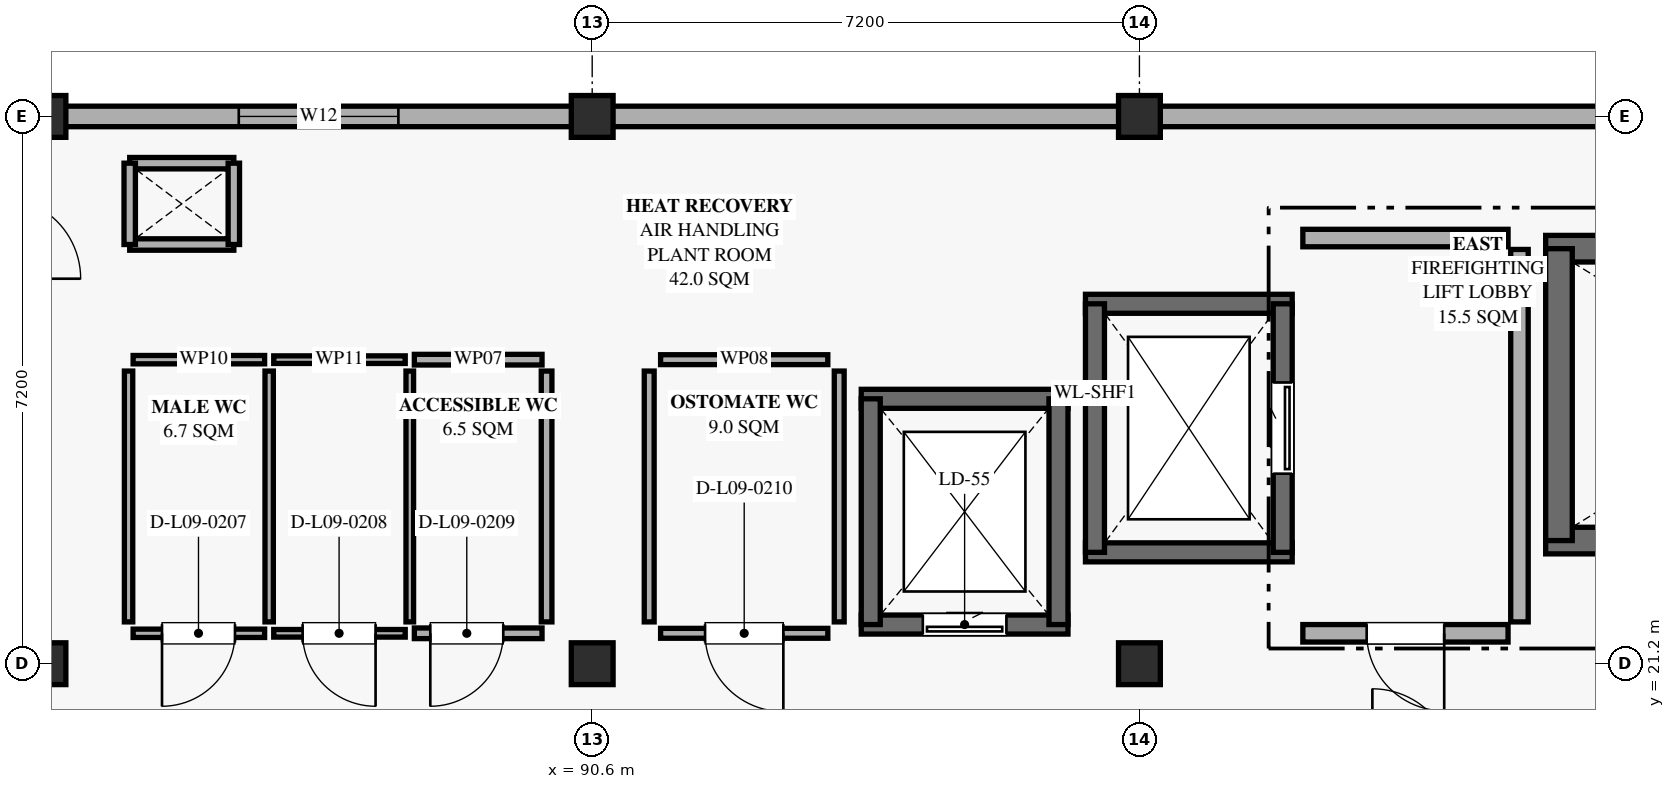
"""IFC4 building model, lengths in metres.
Left out: names, types, materials, properties, quantities, classifications, styles, units other than length and angle.
Written with IfcOpenShell. Run it as: python <this file> out.ifc"""

import sys

from ifc_helpers import new_model, si_unit, direction, frame, frame_2d, origin, origin_2d, place, context, subcontext, project, spatial, rectangle, extrude, element, fill, save


model = new_model("IFC4")
c1 = context("Model", 3, precision=1e-05, world=origin(), true_north=direction((0.0, 1.0)))
c2 = subcontext(c1, "Body", "Model", "MODEL_VIEW")
j1 = project(units=[si_unit("LENGTHUNIT", "METRE"), si_unit("PLANEANGLEUNIT", "RADIAN")], contexts=[c1])
p1 = place(None, origin())
s1 = spatial("IfcSite", under=j1, at=p1, CompositionType="ELEMENT")
p2 = place(p1, origin())
s2 = spatial("IfcBuilding", under=s1, at=p2, CompositionType="ELEMENT")
p3 = place(p2, frame((0.0, 0.0, 41.94)))
s3 = spatial("IfcBuildingStorey", under=s2, at=p3, CompositionType="ELEMENT", Elevation=41.94)
for number, where, z_axis, x_axis in (
    (1, (83.4, 21.2, 0.0), (0.0, 0.0, 1.0), (1.0, 0.0, 0.0)),
    (2, (90.6, 21.2, 0.0), (0.0, 0.0, 1.0), (1.0, 0.0, 0.0)),
    (3, (97.8, 21.2, 0.0), (0.0, 0.0, 1.0), (1.0, 0.0, 0.0)),
    (4, (83.4, 28.4, 0.0), (0.0, 0.0, 1.0), (1.0, 0.0, 0.0)),
    (5, (90.6, 28.4, 0.0), (0.0, 0.0, 1.0), (1.0, 0.0, 0.0)),
    (6, (97.8, 28.4, 0.0), (0.0, 0.0, 1.0), (1.0, 0.0, 0.0)),
):
    element("IfcColumn", number, at=place(p3, frame(where, z_axis=z_axis, x_axis=x_axis)), inside=s3, PredefinedType="COLUMN", context=c2, shape_type="SweptSolid", body=[
        extrude(rectangle(XDim=0.55, YDim=0.55, at=origin_2d()), origin(), (0.0, 0.0, 1.0), 4.32),
    ])
p4 = place(p3, frame((83.66, 28.4, 0.0), z_axis=(0.0, 0.0, 1.0), x_axis=(1.0, 0.0, 0.0)))
e7 = element("IfcWall", 7, at=p4, inside=s3, PredefinedType="SOLIDWALL", context=c2, shape_type="SweptSolid", body=[
    extrude(rectangle(XDim=6.68, YDim=0.27, at=frame_2d((3.34, 0.0))), origin(), (0.0, 0.0, 1.0), 2.82),
])
p5 = place(p4, frame((2.29, 0.0, 0.85)))
e8 = element("IfcOpeningElement", 8, at=p5, cuts=e7, PredefinedType="OPENING", context=c2, shape_type="SweptSolid", body=[
    extrude(rectangle(XDim=2.1, YDim=1.8, at=frame_2d((1.05, 0.9))), frame((0.0, 0.145, 0.0), z_axis=(0.0, -1.0, 0.0), x_axis=(1.0, 0.0, 0.0)), (0.0, 0.0, 1.0), 0.29),
])
for number, where, z_axis, x_axis in (
    (9, (90.86, 28.4, 0.0), (0.0, 0.0, 1.0), (1.0, 0.0, 0.0)),
    (10, (98.06, 28.4, 0.0), (0.0, 0.0, 1.0), (1.0, 0.0, 0.0)),
):
    element("IfcWall", number, at=place(p3, frame(where, z_axis=z_axis, x_axis=x_axis)), inside=s3, PredefinedType="SOLIDWALL", context=c2, shape_type="SweptSolid", body=[
        extrude(rectangle(XDim=6.68, YDim=0.27, at=frame_2d((3.34, 0.0))), origin(), (0.0, 0.0, 1.0), 2.82),
    ])
p6 = place(p3, frame((111.155, 22.82, 0.0), z_axis=(0.0, 0.0, 1.0), x_axis=(-1.0, 0.0, 0.0)))
e11 = element("IfcWall", 11, at=p6, inside=s3, PredefinedType="SHEAR", context=c2, shape_type="SweptSolid", body=[
    extrude(rectangle(XDim=8.01, YDim=0.35, at=frame_2d((4.005, 0.0))), origin(), (0.0, 0.0, 1.0), 4.07),
])
p7 = place(p6, frame((0.85, 0.0, 0.0)))
e12 = element("IfcOpeningElement", 12, at=p7, cuts=e11, PredefinedType="OPENING", context=c2, shape_type="SweptSolid", body=[
    extrude(rectangle(XDim=1.18, YDim=2.12, at=frame_2d((0.59, 1.06))), frame((0.0, 0.185, 0.0), z_axis=(0.0, -1.0, 0.0), x_axis=(1.0, 0.0, 0.0)), (0.0, 0.0, 1.0), 0.37),
])
p8 = place(p3, frame((103.145, 26.66, 0.0), z_axis=(0.0, 0.0, 1.0), x_axis=(1.0, 0.0, 0.0)))
e13 = element("IfcWall", 13, at=p8, inside=s3, PredefinedType="SHEAR", context=c2, shape_type="SweptSolid", body=[
    extrude(rectangle(XDim=8.01, YDim=0.35, at=frame_2d((4.005, 0.0))), origin(), (0.0, 0.0, 1.0), 4.07),
])
p9 = place(p3, frame((103.32, 22.82, 0.0), z_axis=(0.0, 0.0, 1.0), x_axis=(0.0, 1.0, 0.0)))
e14 = element("IfcWall", 14, at=p9, inside=s3, PredefinedType="SHEAR", context=c2, shape_type="SweptSolid", body=[
    extrude(rectangle(XDim=3.84, YDim=0.35, at=frame_2d((1.92, 0.0))), origin(), (0.0, 0.0, 1.0), 4.07),
])
for number, where, z_axis, x_axis in (
    (15, (85.885, 26.715, 0.0), (0.0, 0.0, 1.0), (-1.0, 0.0, 0.0)),
    (16, (84.515, 27.785, 0.0), (0.0, 0.0, 1.0), (1.0, 0.0, 0.0)),
):
    element("IfcWall", number, at=place(p3, frame(where, z_axis=z_axis, x_axis=x_axis)), inside=s3, PredefinedType="PARTITIONING", context=c2, shape_type="SweptSolid", body=[
        extrude(rectangle(XDim=1.37, YDim=0.15, at=frame_2d((0.685, 0.0))), origin(), (0.0, 0.0, 1.0), 2.8),
    ])
for number, where, z_axis, x_axis in (
    (17, (84.515, 26.715, 0.0), (0.0, 0.0, 1.0), (0.0, 1.0, 0.0)),
    (18, (85.885, 27.785, 0.0), (0.0, 0.0, 1.0), (0.0, -1.0, 0.0)),
):
    element("IfcWall", number, at=place(p3, frame(where, z_axis=z_axis, x_axis=x_axis)), inside=s3, PredefinedType="PARTITIONING", context=c2, shape_type="SweptSolid", body=[
        extrude(rectangle(XDim=1.07, YDim=0.15, at=frame_2d((0.535, 0.0))), origin(), (0.0, 0.0, 1.0), 2.8),
    ])
for number, where, z_axis, x_axis in (
    (19, (99.81, 22.665, 0.0), (0.0, 0.0, 1.0), (-1.0, 0.0, 0.0)),
    (20, (97.09, 25.935, 0.0), (0.0, 0.0, 1.0), (1.0, 0.0, 0.0)),
):
    element("IfcWall", number, at=place(p3, frame(where, z_axis=z_axis, x_axis=x_axis)), inside=s3, PredefinedType="SHEAR", context=c2, shape_type="SweptSolid", body=[
        extrude(rectangle(XDim=2.72, YDim=0.25, at=frame_2d((1.36, 0.0))), origin(), (0.0, 0.0, 1.0), 4.07),
    ])
p10 = place(p3, frame((97.215, 22.665, 0.0), z_axis=(0.0, 0.0, 1.0), x_axis=(0.0, 1.0, 0.0)))
e21 = element("IfcWall", 21, at=p10, inside=s3, PredefinedType="SHEAR", context=c2, shape_type="SweptSolid", body=[
    extrude(rectangle(XDim=3.27, YDim=0.25, at=frame_2d((1.635, 0.0))), origin(), (0.0, 0.0, 1.0), 4.07),
])
p11 = place(p3, frame((99.685, 25.935, 0.0), z_axis=(0.0, 0.0, 1.0), x_axis=(0.0, -1.0, 0.0)))
e22 = element("IfcWall", 22, at=p11, inside=s3, PredefinedType="SHEAR", context=c2, shape_type="SweptSolid", body=[
    extrude(rectangle(XDim=3.27, YDim=0.25, at=frame_2d((1.635, 0.0))), origin(), (0.0, 0.0, 1.0), 4.07),
])
p12 = place(p11, frame((1.035, 0.0, 0.0)))
e23 = element("IfcOpeningElement", 23, at=p12, cuts=e22, PredefinedType="OPENING", context=c2, shape_type="SweptSolid", body=[
    extrude(rectangle(XDim=1.2, YDim=2.25, at=frame_2d((0.6, 1.125))), frame((0.0, 0.135, 0.0), z_axis=(0.0, -1.0, 0.0), x_axis=(1.0, 0.0, 0.0)), (0.0, 0.0, 1.0), 0.27),
])
p13 = place(p3, frame((96.86, 21.715, 0.0), z_axis=(0.0, 0.0, 1.0), x_axis=(-1.0, 0.0, 0.0)))
e24 = element("IfcWall", 24, at=p13, inside=s3, PredefinedType="SHEAR", context=c2, shape_type="SweptSolid", body=[
    extrude(rectangle(XDim=2.72, YDim=0.25, at=frame_2d((1.36, 0.0))), origin(), (0.0, 0.0, 1.0), 4.07),
])
p14 = place(p13, frame((0.81, 0.0, 0.0)))
e25 = element("IfcOpeningElement", 25, at=p14, cuts=e24, PredefinedType="OPENING", context=c2, shape_type="SweptSolid", body=[
    extrude(rectangle(XDim=1.1, YDim=2.2, at=frame_2d((0.55, 1.1))), frame((0.0, 0.135, 0.0), z_axis=(0.0, -1.0, 0.0), x_axis=(1.0, 0.0, 0.0)), (0.0, 0.0, 1.0), 0.27),
])
p15 = place(p3, frame((94.14, 24.685, 0.0), z_axis=(0.0, 0.0, 1.0), x_axis=(1.0, 0.0, 0.0)))
e26 = element("IfcWall", 26, at=p15, inside=s3, PredefinedType="SHEAR", context=c2, shape_type="SweptSolid", body=[
    extrude(rectangle(XDim=2.72, YDim=0.25, at=frame_2d((1.36, 0.0))), origin(), (0.0, 0.0, 1.0), 4.07),
])
for number, where, z_axis, x_axis in (
    (27, (94.265, 21.715, 0.0), (0.0, 0.0, 1.0), (0.0, 1.0, 0.0)),
    (28, (96.735, 24.685, 0.0), (0.0, 0.0, 1.0), (0.0, -1.0, 0.0)),
):
    element("IfcWall", number, at=place(p3, frame(where, z_axis=z_axis, x_axis=x_axis)), inside=s3, PredefinedType="SHEAR", context=c2, shape_type="SweptSolid", body=[
        extrude(rectangle(XDim=2.97, YDim=0.25, at=frame_2d((1.485, 0.0))), origin(), (0.0, 0.0, 1.0), 4.07),
    ])
p16 = place(p3, frame((102.65, 21.6, 0.0), z_axis=(0.0, 0.0, 1.0), x_axis=(-1.0, 0.0, 0.0)))
e29 = element("IfcWall", 29, at=p16, inside=s3, PredefinedType="PARTITIONING", context=c2, shape_type="SweptSolid", body=[
    extrude(rectangle(XDim=2.7, YDim=0.23, at=frame_2d((1.35, 0.0))), origin(), (0.0, 0.0, 1.0), 2.8),
])
p17 = place(p16, frame((0.84, 0.0, 0.0)))
e30 = element("IfcOpeningElement", 30, at=p17, cuts=e29, PredefinedType="OPENING", context=c2, shape_type="SweptSolid", body=[
    extrude(rectangle(XDim=1.02, YDim=2.12, at=frame_2d((0.51, 1.06))), frame((0.0, 0.125, 0.0), z_axis=(0.0, -1.0, 0.0), x_axis=(1.0, 0.0, 0.0)), (0.0, 0.0, 1.0), 0.25),
])
p18 = place(p3, frame((99.95, 26.8, 0.0), z_axis=(0.0, 0.0, 1.0), x_axis=(1.0, 0.0, 0.0)))
e31 = element("IfcWall", 31, at=p18, inside=s3, PredefinedType="PARTITIONING", context=c2, shape_type="SweptSolid", body=[
    extrude(rectangle(XDim=2.7, YDim=0.23, at=frame_2d((1.35, 0.0))), origin(), (0.0, 0.0, 1.0), 2.8),
])
p19 = place(p3, frame((102.8, 26.65, 0.0), z_axis=(0.0, 0.0, 1.0), x_axis=(0.0, -1.0, 0.0)))
e32 = element("IfcWall", 32, at=p19, inside=s3, PredefinedType="PARTITIONING", context=c2, shape_type="SweptSolid", body=[
    extrude(rectangle(XDim=4.9, YDim=0.23, at=frame_2d((2.45, 0.0))), origin(), (0.0, 0.0, 1.0), 2.8),
])
p20 = place(p3, frame((86.29, 21.6, 0.0), z_axis=(0.0, 0.0, 1.0), x_axis=(-1.0, 0.0, 0.0)))
e33 = element("IfcWall", 33, at=p20, inside=s3, PredefinedType="PARTITIONING", context=c2, shape_type="SweptSolid", body=[
    extrude(rectangle(XDim=1.73, YDim=0.11, at=frame_2d((0.865, 0.0))), origin(), (0.0, 0.0, 1.0), 2.8),
])
p21 = place(p20, frame((0.39, 0.0, 0.0)))
e34 = element("IfcOpeningElement", 34, at=p21, cuts=e33, PredefinedType="OPENING", context=c2, shape_type="SweptSolid", body=[
    extrude(rectangle(XDim=0.96, YDim=2.05, at=frame_2d((0.48, 1.025))), frame((0.0, 0.065, 0.0), z_axis=(0.0, -1.0, 0.0), x_axis=(1.0, 0.0, 0.0)), (0.0, 0.0, 1.0), 0.13),
])
p22 = place(p3, frame((84.56, 25.2, 0.0), z_axis=(0.0, 0.0, 1.0), x_axis=(1.0, 0.0, 0.0)))
e35 = element("IfcWall", 35, at=p22, inside=s3, PredefinedType="PARTITIONING", context=c2, shape_type="SweptSolid", body=[
    extrude(rectangle(XDim=1.73, YDim=0.11, at=frame_2d((0.865, 0.0))), origin(), (0.0, 0.0, 1.0), 2.8),
])
for number, where, z_axis, x_axis in (
    (36, (84.5, 21.75, 0.0), (0.0, 0.0, 1.0), (0.0, 1.0, 0.0)),
    (37, (86.35, 25.05, 0.0), (0.0, 0.0, 1.0), (0.0, -1.0, 0.0)),
):
    element("IfcWall", number, at=place(p3, frame(where, z_axis=z_axis, x_axis=x_axis)), inside=s3, PredefinedType="PARTITIONING", context=c2, shape_type="SweptSolid", body=[
        extrude(rectangle(XDim=3.3, YDim=0.11, at=frame_2d((1.65, 0.0))), origin(), (0.0, 0.0, 1.0), 2.8),
    ])
p23 = place(p3, frame((88.14, 21.6, 0.0), z_axis=(0.0, 0.0, 1.0), x_axis=(-1.0, 0.0, 0.0)))
e38 = element("IfcWall", 38, at=p23, inside=s3, PredefinedType="PARTITIONING", context=c2, shape_type="SweptSolid", body=[
    extrude(rectangle(XDim=1.73, YDim=0.1, at=frame_2d((0.865, 0.0))), origin(), (0.0, 0.0, 1.0), 2.8),
])
p24 = place(p23, frame((0.39, 0.0, 0.0)))
e39 = element("IfcOpeningElement", 39, at=p24, cuts=e38, PredefinedType="OPENING", context=c2, shape_type="SweptSolid", body=[
    extrude(rectangle(XDim=0.96, YDim=2.1, at=frame_2d((0.48, 1.05))), frame((0.0, 0.06, 0.0), z_axis=(0.0, -1.0, 0.0), x_axis=(1.0, 0.0, 0.0)), (0.0, 0.0, 1.0), 0.12),
])
p25 = place(p3, frame((86.41, 25.2, 0.0), z_axis=(0.0, 0.0, 1.0), x_axis=(1.0, 0.0, 0.0)))
e40 = element("IfcWall", 40, at=p25, inside=s3, PredefinedType="PARTITIONING", context=c2, shape_type="SweptSolid", body=[
    extrude(rectangle(XDim=1.73, YDim=0.1, at=frame_2d((0.865, 0.0))), origin(), (0.0, 0.0, 1.0), 2.8),
])
p26 = place(p3, frame((88.2, 25.05, 0.0), z_axis=(0.0, 0.0, 1.0), x_axis=(0.0, -1.0, 0.0)))
e41 = element("IfcWall", 41, at=p26, inside=s3, PredefinedType="PARTITIONING", context=c2, shape_type="SweptSolid", body=[
    extrude(rectangle(XDim=3.3, YDim=0.1, at=frame_2d((1.65, 0.0))), origin(), (0.0, 0.0, 1.0), 2.8),
])
p27 = place(p3, frame((89.94, 21.6, 0.0), z_axis=(0.0, 0.0, 1.0), x_axis=(-1.0, 0.0, 0.0)))
e42 = element("IfcWall", 42, at=p27, inside=s3, PredefinedType="PARTITIONING", context=c2, shape_type="SweptSolid", body=[
    extrude(rectangle(XDim=1.68, YDim=0.14, at=frame_2d((0.84, 0.0))), origin(), (0.0, 0.0, 1.0), 2.8),
])
p28 = place(p27, frame((0.51, 0.0, 0.0)))
e43 = element("IfcOpeningElement", 43, at=p28, cuts=e42, PredefinedType="OPENING", context=c2, shape_type="SweptSolid", body=[
    extrude(rectangle(XDim=0.96, YDim=2.16, at=frame_2d((0.48, 1.08))), frame((0.0, 0.08, 0.0), z_axis=(0.0, -1.0, 0.0), x_axis=(1.0, 0.0, 0.0)), (0.0, 0.0, 1.0), 0.16),
])
p29 = place(p3, frame((88.26, 25.2, 0.0), z_axis=(0.0, 0.0, 1.0), x_axis=(1.0, 0.0, 0.0)))
e44 = element("IfcWall", 44, at=p29, inside=s3, PredefinedType="PARTITIONING", context=c2, shape_type="SweptSolid", body=[
    extrude(rectangle(XDim=1.68, YDim=0.14, at=frame_2d((0.84, 0.0))), origin(), (0.0, 0.0, 1.0), 2.8),
])
p30 = place(p3, frame((90.0, 25.05, 0.0), z_axis=(0.0, 0.0, 1.0), x_axis=(0.0, -1.0, 0.0)))
e45 = element("IfcWall", 45, at=p30, inside=s3, PredefinedType="PARTITIONING", context=c2, shape_type="SweptSolid", body=[
    extrude(rectangle(XDim=3.3, YDim=0.14, at=frame_2d((1.65, 0.0))), origin(), (0.0, 0.0, 1.0), 2.8),
])
p31 = place(p3, frame((93.7, 21.6, 0.0), z_axis=(0.0, 0.0, 1.0), x_axis=(-1.0, 0.0, 0.0)))
e46 = element("IfcWall", 46, at=p31, inside=s3, PredefinedType="PARTITIONING", context=c2, shape_type="SweptSolid", body=[
    extrude(rectangle(XDim=2.2, YDim=0.13, at=frame_2d((1.1, 0.0))), origin(), (0.0, 0.0, 1.0), 2.8),
])
p32 = place(p31, frame((0.585, 0.0, 0.0)))
e47 = element("IfcOpeningElement", 47, at=p32, cuts=e46, PredefinedType="OPENING", context=c2, shape_type="SweptSolid", body=[
    extrude(rectangle(XDim=1.03, YDim=2.22, at=frame_2d((0.515, 1.11))), frame((0.0, 0.075, 0.0), z_axis=(0.0, -1.0, 0.0), x_axis=(1.0, 0.0, 0.0)), (0.0, 0.0, 1.0), 0.15),
])
p33 = place(p3, frame((91.5, 25.2, 0.0), z_axis=(0.0, 0.0, 1.0), x_axis=(1.0, 0.0, 0.0)))
e48 = element("IfcWall", 48, at=p33, inside=s3, PredefinedType="PARTITIONING", context=c2, shape_type="SweptSolid", body=[
    extrude(rectangle(XDim=2.2, YDim=0.13, at=frame_2d((1.1, 0.0))), origin(), (0.0, 0.0, 1.0), 2.8),
])
for number, where, z_axis, x_axis in (
    (49, (91.35, 21.75, 0.0), (0.0, 0.0, 1.0), (0.0, 1.0, 0.0)),
    (50, (93.85, 25.05, 0.0), (0.0, 0.0, 1.0), (0.0, -1.0, 0.0)),
):
    element("IfcWall", number, at=place(p3, frame(where, z_axis=z_axis, x_axis=x_axis)), inside=s3, PredefinedType="PARTITIONING", context=c2, shape_type="SweptSolid", body=[
        extrude(rectangle(XDim=3.3, YDim=0.13, at=frame_2d((1.65, 0.0))), origin(), (0.0, 0.0, 1.0), 2.8),
    ])
p34 = place(p5, origin())
e51 = element("IfcWindow", 51, at=p34, inside=s3, PartitioningType="DOUBLE_PANEL_VERTICAL", PredefinedType="WINDOW", context=c2, shape_type="SweptSolid", body=[
    extrude(rectangle(XDim=2.1, YDim=1.8, at=frame_2d((1.05, 0.9))), frame((0.0, 0.03, 0.0), z_axis=(0.0, -1.0, 0.0), x_axis=(1.0, 0.0, 0.0)), (0.0, 0.0, 1.0), 0.06),
])
fill(e8, e51)
p35 = place(p12, origin())
e52 = element("IfcDoor", 52, at=p35, inside=s3, OperationType="SLIDING_TO_LEFT", PredefinedType="DOOR", context=c2, shape_type="SweptSolid", body=[
    extrude(rectangle(XDim=1.2, YDim=2.25, at=frame_2d((0.6, 1.125))), frame((0.0, 0.025, 0.0), z_axis=(0.0, -1.0, 0.0), x_axis=(1.0, 0.0, 0.0)), (0.0, 0.0, 1.0), 0.05),
])
fill(e23, e52)
p36 = place(p14, origin())
e53 = element("IfcDoor", 53, at=p36, inside=s3, OperationType="SLIDING_TO_LEFT", PredefinedType="DOOR", context=c2, shape_type="SweptSolid", body=[
    extrude(rectangle(XDim=1.1, YDim=2.2, at=frame_2d((0.55, 1.1))), frame((0.0, 0.025, 0.0), z_axis=(0.0, -1.0, 0.0), x_axis=(1.0, 0.0, 0.0)), (0.0, 0.0, 1.0), 0.05),
])
fill(e25, e53)
p37 = place(p17, origin())
e54 = element("IfcDoor", 54, at=p37, inside=s3, OperationType="SINGLE_SWING_LEFT", PredefinedType="DOOR", context=c2, shape_type="SweptSolid", body=[
    extrude(rectangle(XDim=1.02, YDim=2.12, at=frame_2d((0.51, 1.06))), frame((0.0, 0.025, 0.0), z_axis=(0.0, -1.0, 0.0), x_axis=(1.0, 0.0, 0.0)), (0.0, 0.0, 1.0), 0.05),
])
fill(e30, e54)
p38 = place(p21, origin())
e55 = element("IfcDoor", 55, at=p38, inside=s3, OperationType="SINGLE_SWING_RIGHT", PredefinedType="DOOR", context=c2, shape_type="SweptSolid", body=[
    extrude(rectangle(XDim=0.96, YDim=2.05, at=frame_2d((0.48, 1.025))), frame((0.0, 0.025, 0.0), z_axis=(0.0, -1.0, 0.0), x_axis=(1.0, 0.0, 0.0)), (0.0, 0.0, 1.0), 0.05),
])
fill(e34, e55)
p39 = place(p24, origin())
e56 = element("IfcDoor", 56, at=p39, inside=s3, OperationType="SINGLE_SWING_LEFT", PredefinedType="DOOR", context=c2, shape_type="SweptSolid", body=[
    extrude(rectangle(XDim=0.96, YDim=2.1, at=frame_2d((0.48, 1.05))), frame((0.0, 0.025, 0.0), z_axis=(0.0, -1.0, 0.0), x_axis=(1.0, 0.0, 0.0)), (0.0, 0.0, 1.0), 0.05),
])
fill(e39, e56)
p40 = place(p28, origin())
e57 = element("IfcDoor", 57, at=p40, inside=s3, OperationType="SINGLE_SWING_RIGHT", PredefinedType="DOOR", context=c2, shape_type="SweptSolid", body=[
    extrude(rectangle(XDim=0.96, YDim=2.16, at=frame_2d((0.48, 1.08))), frame((0.0, 0.025, 0.0), z_axis=(0.0, -1.0, 0.0), x_axis=(1.0, 0.0, 0.0)), (0.0, 0.0, 1.0), 0.05),
])
fill(e43, e57)
p41 = place(p32, origin())
e58 = element("IfcDoor", 58, at=p41, inside=s3, OperationType="SINGLE_SWING_LEFT", PredefinedType="DOOR", context=c2, shape_type="SweptSolid", body=[
    extrude(rectangle(XDim=1.03, YDim=2.22, at=frame_2d((0.515, 1.11))), frame((0.0, 0.025, 0.0), z_axis=(0.0, -1.0, 0.0), x_axis=(1.0, 0.0, 0.0)), (0.0, 0.0, 1.0), 0.05),
])
fill(e47, e58)
save(model, sys.argv[1])
